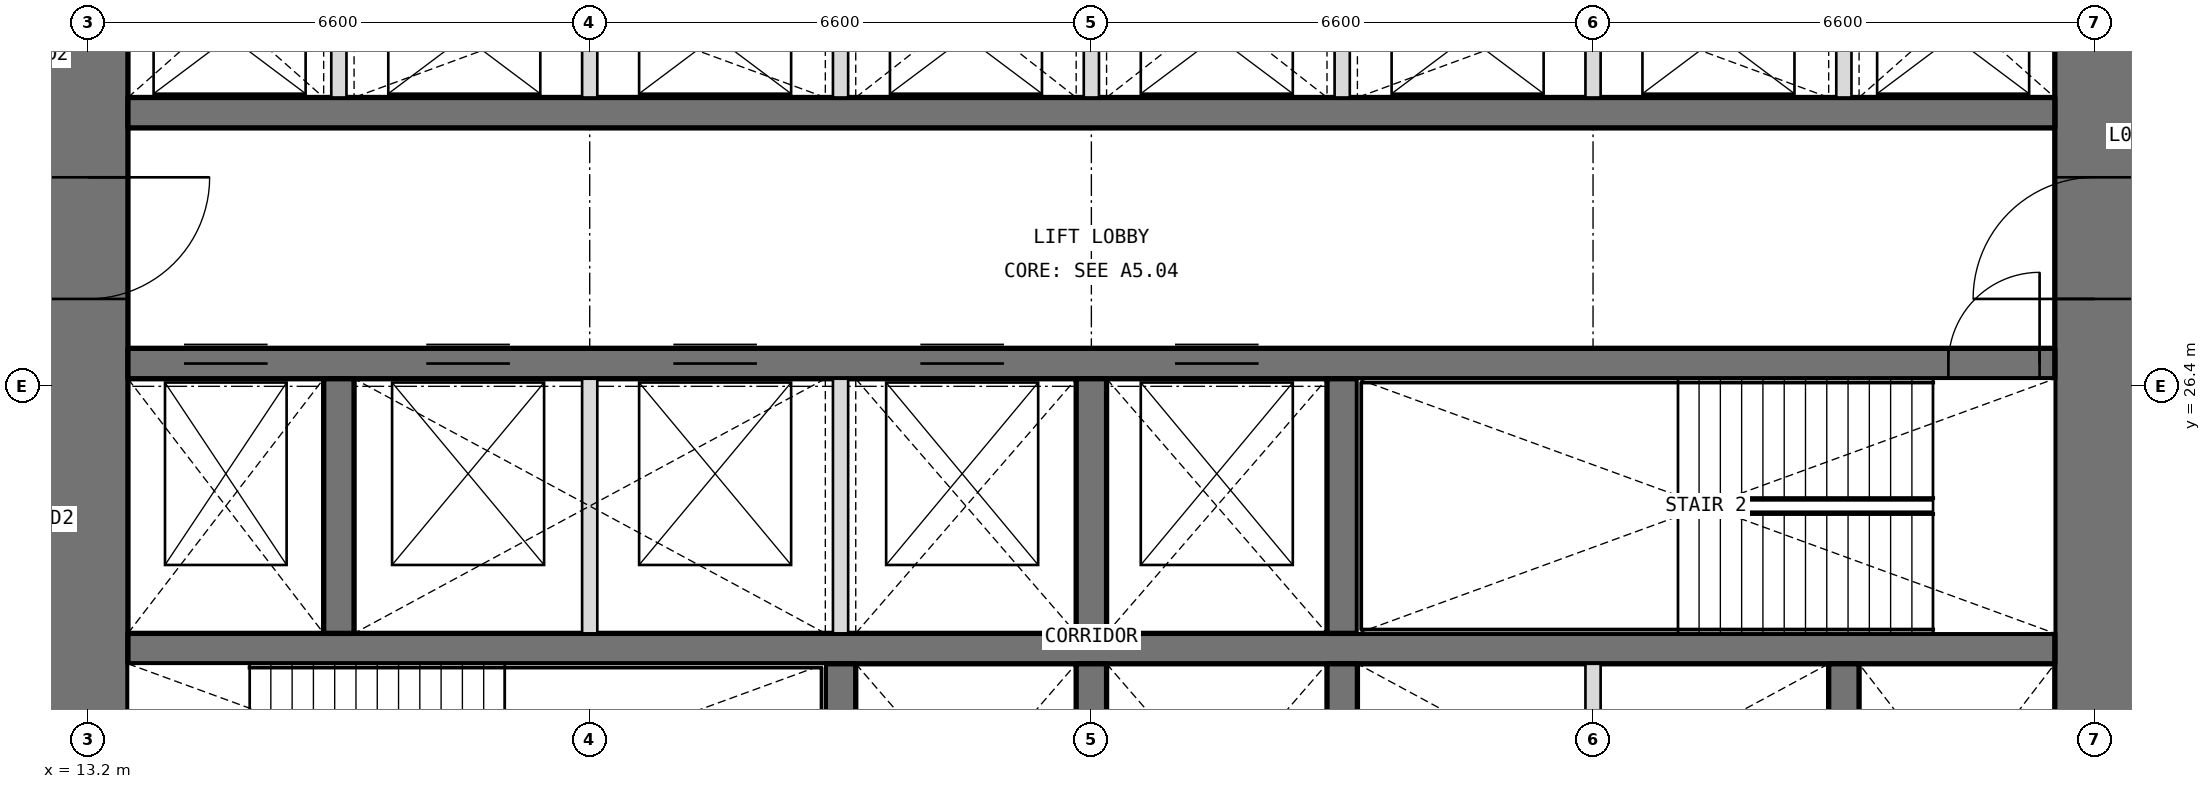
"""IFC4 building model, lengths in metres.
Left out: names, types, materials, properties, quantities, classifications, styles, units other than length and angle.
Written with IfcOpenShell. Run it as: python <this file> out.ifc"""

import sys

from ifc_helpers import new_model, si_unit, direction, frame, frame_2d, origin, place, context, subcontext, project, spatial, rectangle, extrude, element, fill, save


model = new_model("IFC4")
c1 = context("Model", 3, precision=1e-05, world=origin(), true_north=direction((0.0, 1.0)))
c2 = subcontext(c1, "Body", "Model", "MODEL_VIEW")
j1 = project(units=[si_unit("LENGTHUNIT", "METRE"), si_unit("PLANEANGLEUNIT", "RADIAN")], contexts=[c1])
p1 = place(None, origin())
s1 = spatial("IfcSite", under=j1, at=p1, CompositionType="ELEMENT")
p2 = place(p1, origin())
s2 = spatial("IfcBuilding", under=s1, at=p2, CompositionType="ELEMENT")
p3 = place(p2, frame((0.0, 0.0, 12.6)))
s3 = spatial("IfcBuildingStorey", under=s2, at=p3, CompositionType="ELEMENT", Elevation=12.6)
p4 = place(p3, frame((39.6, 13.725, 0.0), z_axis=(0.0, 0.0, 1.0), x_axis=(0.0, 1.0, 0.0)))
e1 = element("IfcWall", 1, at=p4, inside=s3, PredefinedType="SHEAR", context=c2, shape_type="SweptSolid", body=[
    extrude(rectangle(XDim=18.75, YDim=1.05, at=frame_2d((9.375, 0.0))), origin(), (0.0, 0.0, 1.0), 4.5),
])
p5 = place(p4, frame((3.025, 0.0, 0.0)))
e2 = element("IfcOpeningElement", 2, at=p5, cuts=e1, PredefinedType="OPENING", context=c2, shape_type="SweptSolid", body=[
    extrude(rectangle(XDim=1.6, YDim=2.1, at=frame_2d((0.8, 1.05))), frame((0.0, 0.535, 0.0), z_axis=(0.0, -1.0, 0.0), x_axis=(1.0, 0.0, 0.0)), (0.0, 0.0, 1.0), 1.07),
])
p6 = place(p4, frame((13.825, 0.0, 0.0)))
e3 = element("IfcOpeningElement", 3, at=p6, cuts=e1, PredefinedType="OPENING", context=c2, shape_type="SweptSolid", body=[
    extrude(rectangle(XDim=1.6, YDim=2.1, at=frame_2d((0.8, 1.05))), frame((0.0, 0.535, 0.0), z_axis=(0.0, -1.0, 0.0), x_axis=(1.0, 0.0, 0.0)), (0.0, 0.0, 1.0), 1.07),
])
p7 = place(p3, frame((13.2, 32.475, 0.0), z_axis=(0.0, 0.0, 1.0), x_axis=(0.0, -1.0, 0.0)))
e4 = element("IfcWall", 4, at=p7, inside=s3, PredefinedType="SHEAR", context=c2, shape_type="SweptSolid", body=[
    extrude(rectangle(XDim=18.75, YDim=1.05, at=frame_2d((9.375, 0.0))), origin(), (0.0, 0.0, 1.0), 4.5),
])
p8 = place(p7, frame((14.125, 0.0, 0.0)))
e5 = element("IfcOpeningElement", 5, at=p8, cuts=e4, PredefinedType="OPENING", context=c2, shape_type="SweptSolid", body=[
    extrude(rectangle(XDim=1.6, YDim=2.1, at=frame_2d((0.8, 1.05))), frame((0.0, 0.535, 0.0), z_axis=(0.0, -1.0, 0.0), x_axis=(1.0, 0.0, 0.0)), (0.0, 0.0, 1.0), 1.07),
])
p9 = place(p7, frame((3.325, 0.0, 0.0)))
e6 = element("IfcOpeningElement", 6, at=p9, cuts=e4, PredefinedType="OPENING", context=c2, shape_type="SweptSolid", body=[
    extrude(rectangle(XDim=1.6, YDim=2.1, at=frame_2d((0.8, 1.05))), frame((0.0, 0.535, 0.0), z_axis=(0.0, -1.0, 0.0), x_axis=(1.0, 0.0, 0.0)), (0.0, 0.0, 1.0), 1.07),
])
p10 = place(p3, frame((13.725, 22.95, 0.0), z_axis=(0.0, 0.0, 1.0), x_axis=(1.0, 0.0, 0.0)))
e7 = element("IfcWall", 7, at=p10, inside=s3, PredefinedType="SHEAR", context=c2, shape_type="SweptSolid", body=[
    extrude(rectangle(XDim=25.35, YDim=0.4, at=frame_2d((12.675, 0.0))), origin(), (0.0, 0.0, 1.0), 4.5),
])
p11 = place(p3, frame((13.725, 26.7, 0.0), z_axis=(0.0, 0.0, 1.0), x_axis=(1.0, 0.0, 0.0)))
e8 = element("IfcWall", 8, at=p11, inside=s3, PredefinedType="SHEAR", context=c2, shape_type="SweptSolid", body=[
    extrude(rectangle(XDim=25.35, YDim=0.4, at=frame_2d((12.675, 0.0))), origin(), (0.0, 0.0, 1.0), 4.5),
])
p12 = place(p11, frame((23.95, 0.0, 0.0)))
e9 = element("IfcOpeningElement", 9, at=p12, cuts=e8, PredefinedType="OPENING", context=c2, shape_type="SweptSolid", body=[
    extrude(rectangle(XDim=1.2, YDim=2.1, at=frame_2d((0.6, 1.05))), frame((0.0, 0.21, 0.0), z_axis=(0.0, -1.0, 0.0), x_axis=(1.0, 0.0, 0.0)), (0.0, 0.0, 1.0), 0.42),
])
p13 = place(p11, frame((0.738, 0.0, 0.0)))
e10 = element("IfcOpeningElement", 10, at=p13, cuts=e8, PredefinedType="OPENING", context=c2, shape_type="SweptSolid", body=[
    extrude(rectangle(XDim=1.1, YDim=2.1, at=frame_2d((0.55, 1.05))), frame((0.0, 0.21, 0.0), z_axis=(0.0, -1.0, 0.0), x_axis=(1.0, 0.0, 0.0)), (0.0, 0.0, 1.0), 0.42),
])
p14 = place(p11, frame((3.925, 0.0, 0.0)))
e11 = element("IfcOpeningElement", 11, at=p14, cuts=e8, PredefinedType="OPENING", context=c2, shape_type="SweptSolid", body=[
    extrude(rectangle(XDim=1.1, YDim=2.1, at=frame_2d((0.55, 1.05))), frame((0.0, 0.21, 0.0), z_axis=(0.0, -1.0, 0.0), x_axis=(1.0, 0.0, 0.0)), (0.0, 0.0, 1.0), 0.42),
])
p15 = place(p11, frame((7.175, 0.0, 0.0)))
e12 = element("IfcOpeningElement", 12, at=p15, cuts=e8, PredefinedType="OPENING", context=c2, shape_type="SweptSolid", body=[
    extrude(rectangle(XDim=1.1, YDim=2.1, at=frame_2d((0.55, 1.05))), frame((0.0, 0.21, 0.0), z_axis=(0.0, -1.0, 0.0), x_axis=(1.0, 0.0, 0.0)), (0.0, 0.0, 1.0), 0.42),
])
p16 = place(p11, frame((10.425, 0.0, 0.0)))
e13 = element("IfcOpeningElement", 13, at=p16, cuts=e8, PredefinedType="OPENING", context=c2, shape_type="SweptSolid", body=[
    extrude(rectangle(XDim=1.1, YDim=2.1, at=frame_2d((0.55, 1.05))), frame((0.0, 0.21, 0.0), z_axis=(0.0, -1.0, 0.0), x_axis=(1.0, 0.0, 0.0)), (0.0, 0.0, 1.0), 0.42),
])
p17 = place(p11, frame((13.775, 0.0, 0.0)))
e14 = element("IfcOpeningElement", 14, at=p17, cuts=e8, PredefinedType="OPENING", context=c2, shape_type="SweptSolid", body=[
    extrude(rectangle(XDim=1.1, YDim=2.1, at=frame_2d((0.55, 1.05))), frame((0.0, 0.21, 0.0), z_axis=(0.0, -1.0, 0.0), x_axis=(1.0, 0.0, 0.0)), (0.0, 0.0, 1.0), 0.42),
])
p18 = place(p3, frame((13.725, 30.0, 0.0), z_axis=(0.0, 0.0, 1.0), x_axis=(1.0, 0.0, 0.0)))
e15 = element("IfcWall", 15, at=p18, inside=s3, PredefinedType="SHEAR", context=c2, shape_type="SweptSolid", body=[
    extrude(rectangle(XDim=25.35, YDim=0.4, at=frame_2d((12.675, 0.0))), origin(), (0.0, 0.0, 1.0), 4.5),
])
for number, where, z_axis, x_axis in (
    (16, (23.1, 19.4, 0.0), (0.0, 0.0, 1.0), (0.0, 1.0, 0.0)),
    (17, (26.4, 19.4, 0.0), (0.0, 0.0, 1.0), (0.0, 1.0, 0.0)),
    (18, (29.7, 19.4, 0.0), (0.0, 0.0, 1.0), (0.0, 1.0, 0.0)),
    (19, (36.3, 19.4, 0.0), (0.0, 0.0, 1.0), (0.0, 1.0, 0.0)),
    (20, (16.5, 23.15, 0.0), (0.0, 0.0, 1.0), (0.0, 1.0, 0.0)),
    (21, (26.4, 23.15, 0.0), (0.0, 0.0, 1.0), (0.0, 1.0, 0.0)),
    (22, (29.7, 23.15, 0.0), (0.0, 0.0, 1.0), (0.0, 1.0, 0.0)),
):
    element("IfcWall", number, at=place(p3, frame(where, z_axis=z_axis, x_axis=x_axis)), inside=s3, PredefinedType="SHEAR", context=c2, shape_type="SweptSolid", body=[
        extrude(rectangle(XDim=3.35, YDim=0.4, at=frame_2d((1.675, 0.0))), origin(), (0.0, 0.0, 1.0), 4.5),
    ])
for number, where, z_axis, x_axis in (
    (23, (16.5, 30.2, 0.0), (0.0, 0.0, 1.0), (0.0, 1.0, 0.0)),
    (24, (19.8, 30.2, 0.0), (0.0, 0.0, 1.0), (0.0, 1.0, 0.0)),
    (25, (23.1, 30.2, 0.0), (0.0, 0.0, 1.0), (0.0, 1.0, 0.0)),
    (26, (26.4, 30.2, 0.0), (0.0, 0.0, 1.0), (0.0, 1.0, 0.0)),
    (27, (29.7, 30.2, 0.0), (0.0, 0.0, 1.0), (0.0, 1.0, 0.0)),
    (28, (33.0, 30.2, 0.0), (0.0, 0.0, 1.0), (0.0, 1.0, 0.0)),
    (29, (36.3, 30.2, 0.0), (0.0, 0.0, 1.0), (0.0, 1.0, 0.0)),
):
    element("IfcWall", number, at=place(p3, frame(where, z_axis=z_axis, x_axis=x_axis)), inside=s3, PredefinedType="PARTITIONING", context=c2, shape_type="SweptSolid", body=[
        extrude(rectangle(XDim=2.275, YDim=0.2, at=frame_2d((1.138, 0.0))), origin(), (0.0, 0.0, 1.0), 4.5),
    ])
for number, where, z_axis, x_axis in (
    (30, (33.0, 19.4, 0.0), (0.0, 0.0, 1.0), (0.0, 1.0, 0.0)),
    (31, (19.8, 23.15, 0.0), (0.0, 0.0, 1.0), (0.0, 1.0, 0.0)),
    (32, (23.1, 23.15, 0.0), (0.0, 0.0, 1.0), (0.0, 1.0, 0.0)),
):
    element("IfcWall", number, at=place(p3, frame(where, z_axis=z_axis, x_axis=x_axis)), inside=s3, PredefinedType="PARTITIONING", context=c2, shape_type="SweptSolid", body=[
        extrude(rectangle(XDim=3.35, YDim=0.2, at=frame_2d((1.675, 0.0))), origin(), (0.0, 0.0, 1.0), 4.5),
    ])
p19 = place(p12, origin())
e33 = element("IfcDoor", 33, at=p19, inside=s3, OperationType="SINGLE_SWING_RIGHT", PredefinedType="DOOR", context=c2, shape_type="SweptSolid", body=[
    extrude(rectangle(XDim=1.2, YDim=2.1, at=frame_2d((0.6, 1.05))), frame((0.0, 0.025, 0.0), z_axis=(0.0, -1.0, 0.0), x_axis=(1.0, 0.0, 0.0)), (0.0, 0.0, 1.0), 0.05),
])
fill(e9, e33)
p20 = place(p9, origin())
e34 = element("IfcDoor", 34, at=p20, inside=s3, OperationType="DOUBLE_DOOR_DOUBLE_SWING", PredefinedType="DOOR", context=c2, shape_type="SweptSolid", body=[
    extrude(rectangle(XDim=1.6, YDim=2.1, at=frame_2d((0.8, 1.05))), frame((0.0, 0.025, 0.0), z_axis=(0.0, -1.0, 0.0), x_axis=(1.0, 0.0, 0.0)), (0.0, 0.0, 1.0), 0.05),
])
fill(e6, e34)
p21 = place(p6, origin())
e35 = element("IfcDoor", 35, at=p21, inside=s3, OperationType="DOUBLE_DOOR_DOUBLE_SWING", PredefinedType="DOOR", context=c2, shape_type="SweptSolid", body=[
    extrude(rectangle(XDim=1.6, YDim=2.1, at=frame_2d((0.8, 1.05))), frame((0.0, 0.025, 0.0), z_axis=(0.0, -1.0, 0.0), x_axis=(1.0, 0.0, 0.0)), (0.0, 0.0, 1.0), 0.05),
])
fill(e3, e35)
p22 = place(p13, origin())
e36 = element("IfcDoor", 36, at=p22, inside=s3, OperationType="DOUBLE_DOOR_SLIDING", PredefinedType="DOOR", context=c2, shape_type="SweptSolid", body=[
    extrude(rectangle(XDim=1.1, YDim=2.1, at=frame_2d((0.55, 1.05))), frame((0.0, 0.025, 0.0), z_axis=(0.0, -1.0, 0.0), x_axis=(1.0, 0.0, 0.0)), (0.0, 0.0, 1.0), 0.05),
])
fill(e10, e36)
p23 = place(p14, origin())
e37 = element("IfcDoor", 37, at=p23, inside=s3, OperationType="DOUBLE_DOOR_SLIDING", PredefinedType="DOOR", context=c2, shape_type="SweptSolid", body=[
    extrude(rectangle(XDim=1.1, YDim=2.1, at=frame_2d((0.55, 1.05))), frame((0.0, 0.025, 0.0), z_axis=(0.0, -1.0, 0.0), x_axis=(1.0, 0.0, 0.0)), (0.0, 0.0, 1.0), 0.05),
])
fill(e11, e37)
p24 = place(p15, origin())
e38 = element("IfcDoor", 38, at=p24, inside=s3, OperationType="DOUBLE_DOOR_SLIDING", PredefinedType="DOOR", context=c2, shape_type="SweptSolid", body=[
    extrude(rectangle(XDim=1.1, YDim=2.1, at=frame_2d((0.55, 1.05))), frame((0.0, 0.025, 0.0), z_axis=(0.0, -1.0, 0.0), x_axis=(1.0, 0.0, 0.0)), (0.0, 0.0, 1.0), 0.05),
])
fill(e12, e38)
p25 = place(p16, origin())
e39 = element("IfcDoor", 39, at=p25, inside=s3, OperationType="DOUBLE_DOOR_SLIDING", PredefinedType="DOOR", context=c2, shape_type="SweptSolid", body=[
    extrude(rectangle(XDim=1.1, YDim=2.1, at=frame_2d((0.55, 1.05))), frame((0.0, 0.025, 0.0), z_axis=(0.0, -1.0, 0.0), x_axis=(1.0, 0.0, 0.0)), (0.0, 0.0, 1.0), 0.05),
])
fill(e13, e39)
p26 = place(p17, origin())
e40 = element("IfcDoor", 40, at=p26, inside=s3, OperationType="DOUBLE_DOOR_SLIDING", PredefinedType="DOOR", context=c2, shape_type="SweptSolid", body=[
    extrude(rectangle(XDim=1.1, YDim=2.1, at=frame_2d((0.55, 1.05))), frame((0.0, 0.025, 0.0), z_axis=(0.0, -1.0, 0.0), x_axis=(1.0, 0.0, 0.0)), (0.0, 0.0, 1.0), 0.05),
])
fill(e14, e40)
save(model, sys.argv[1])
